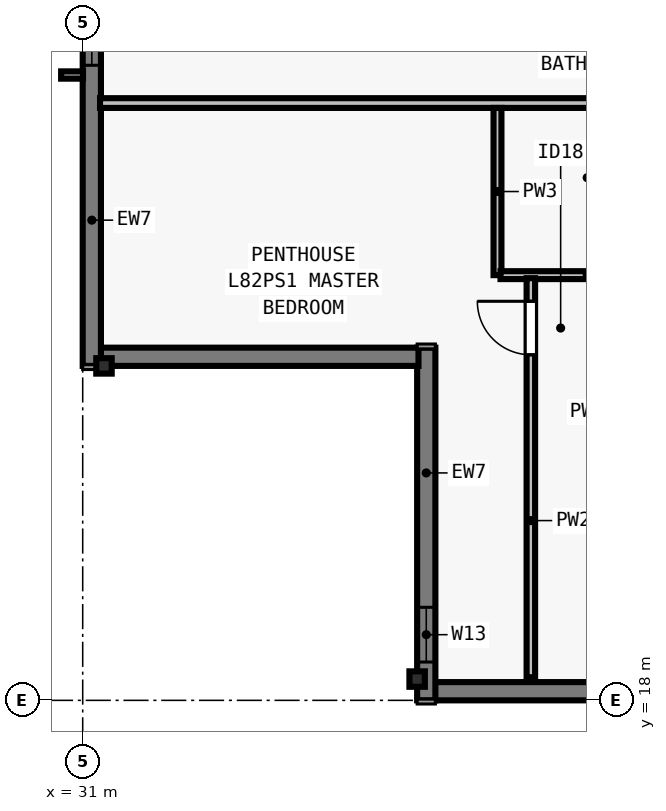
"""IFC4 building model, lengths in metres.
Left out: names, types, materials, properties, quantities, classifications, styles, units other than length and angle.
Written with IfcOpenShell. Run it as: python <this file> out.ifc"""

import sys

from ifc_helpers import new_model, si_unit, direction, frame, frame_2d, origin, origin_2d, place, context, subcontext, project, spatial, rectangle, i_section, extrude, element, fill, save


model = new_model("IFC4")
c1 = context("Model", 3, precision=1e-05, world=origin(), true_north=direction((0.0, 1.0)))
c2 = subcontext(c1, "Body", "Model", "MODEL_VIEW")
j1 = project(units=[si_unit("LENGTHUNIT", "METRE"), si_unit("PLANEANGLEUNIT", "RADIAN")], contexts=[c1])
p1 = place(None, origin())
s1 = spatial("IfcSite", under=j1, at=p1, CompositionType="ELEMENT")
p2 = place(p1, origin())
s2 = spatial("IfcBuilding", under=s1, at=p2, CompositionType="ELEMENT")
p3 = place(p2, frame((0.0, 0.0, 298.0)))
s3 = spatial("IfcBuildingStorey", under=s2, at=p3, CompositionType="ELEMENT", Elevation=298.0)
for number, where, z_axis, x_axis in (
    (1, (36.5, 18.35, 0.0), (0.0, 0.0, 1.0), (1.0, 0.0, 0.0)),
    (2, (31.35, 23.5, 0.0), (0.0, 0.0, 1.0), (0.0, 1.0, 0.0)),
):
    element("IfcColumn", number, at=place(p3, frame(where, z_axis=z_axis, x_axis=x_axis)), inside=s3, PredefinedType="COLUMN", context=c2, shape_type="SweptSolid", body=[
        extrude(i_section(OverallWidth=0.254, OverallDepth=0.254, WebThickness=0.009, FlangeThickness=0.014, FilletRadius=0.013, at=origin_2d()), origin(), (0.0, 0.0, 1.0), 3.5),
    ])
p4 = place(p3, frame((67.5, 18.15, 0.0), z_axis=(0.0, 0.0, 1.0), x_axis=(-1.0, 0.0, 0.0)))
e3 = element("IfcWall", 3, at=p4, inside=s3, PredefinedType="SOLIDWALL", context=c2, shape_type="SweptSolid", body=[
    extrude(rectangle(XDim=30.722, YDim=0.3, at=frame_2d((15.361, 0.0))), origin(), (0.0, 0.0, 1.0), 3.29),
])
p5 = place(p4, frame((4.944, 0.0, 0.8)))
e4 = element("IfcOpeningElement", 4, at=p5, cuts=e3, PredefinedType="OPENING", context=c2, shape_type="SweptSolid", body=[
    extrude(rectangle(XDim=1.65, YDim=1.758, at=frame_2d((0.825, 0.879))), frame((0.0, 0.16, 0.0), z_axis=(0.0, -1.0, 0.0), x_axis=(1.0, 0.0, 0.0)), (0.0, 0.0, 1.0), 0.32),
])
p6 = place(p4, frame((7.756, 0.0, 0.8)))
e5 = element("IfcOpeningElement", 5, at=p6, cuts=e3, PredefinedType="OPENING", context=c2, shape_type="SweptSolid", body=[
    extrude(rectangle(XDim=2.0, YDim=1.758, at=frame_2d((1.0, 0.879))), frame((0.0, 0.16, 0.0), z_axis=(0.0, -1.0, 0.0), x_axis=(1.0, 0.0, 0.0)), (0.0, 0.0, 1.0), 0.32),
])
p7 = place(p4, frame((12.617, 0.0, 0.8)))
e6 = element("IfcOpeningElement", 6, at=p7, cuts=e3, PredefinedType="OPENING", context=c2, shape_type="SweptSolid", body=[
    extrude(rectangle(XDim=1.65, YDim=1.758, at=frame_2d((0.825, 0.879))), frame((0.0, 0.16, 0.0), z_axis=(0.0, -1.0, 0.0), x_axis=(1.0, 0.0, 0.0)), (0.0, 0.0, 1.0), 0.32),
])
p8 = place(p4, frame((16.28, 0.0, 0.8)))
e7 = element("IfcOpeningElement", 7, at=p8, cuts=e3, PredefinedType="OPENING", context=c2, shape_type="SweptSolid", body=[
    extrude(rectangle(XDim=2.0, YDim=1.758, at=frame_2d((1.0, 0.879))), frame((0.0, 0.16, 0.0), z_axis=(0.0, -1.0, 0.0), x_axis=(1.0, 0.0, 0.0)), (0.0, 0.0, 1.0), 0.32),
])
p9 = place(p4, frame((21.142, 0.0, 0.8)))
e8 = element("IfcOpeningElement", 8, at=p9, cuts=e3, PredefinedType="OPENING", context=c2, shape_type="SweptSolid", body=[
    extrude(rectangle(XDim=1.65, YDim=1.758, at=frame_2d((0.825, 0.879))), frame((0.0, 0.16, 0.0), z_axis=(0.0, -1.0, 0.0), x_axis=(1.0, 0.0, 0.0)), (0.0, 0.0, 1.0), 0.32),
])
p10 = place(p4, frame((23.954, 0.0, 0.8)))
e9 = element("IfcOpeningElement", 9, at=p10, cuts=e3, PredefinedType="OPENING", context=c2, shape_type="SweptSolid", body=[
    extrude(rectangle(XDim=2.0, YDim=1.758, at=frame_2d((1.0, 0.879))), frame((0.0, 0.16, 0.0), z_axis=(0.0, -1.0, 0.0), x_axis=(1.0, 0.0, 0.0)), (0.0, 0.0, 1.0), 0.32),
])
p11 = place(p3, frame((36.65, 18.0, 0.0), z_axis=(0.0, 0.0, 1.0), x_axis=(0.0, 1.0, 0.0)))
e10 = element("IfcWall", 10, at=p11, inside=s3, PredefinedType="SOLIDWALL", context=c2, shape_type="SweptSolid", body=[
    extrude(rectangle(XDim=5.8, YDim=0.3, at=frame_2d((2.9, 0.0))), origin(), (0.0, 0.0, 1.0), 3.29),
])
p12 = place(p11, frame((0.63, 0.0, 0.8)))
e11 = element("IfcOpeningElement", 11, at=p12, cuts=e10, PredefinedType="OPENING", context=c2, shape_type="SweptSolid", body=[
    extrude(rectangle(XDim=0.9, YDim=1.75, at=frame_2d((0.45, 0.875))), frame((0.0, 0.16, 0.0), z_axis=(0.0, -1.0, 0.0), x_axis=(1.0, 0.0, 0.0)), (0.0, 0.0, 1.0), 0.32),
])
p13 = place(p3, frame((36.522, 23.65, 0.0), z_axis=(0.0, 0.0, 1.0), x_axis=(-1.0, 0.0, 0.0)))
e12 = element("IfcWall", 12, at=p13, inside=s3, PredefinedType="SOLIDWALL", context=c2, shape_type="SweptSolid", body=[
    extrude(rectangle(XDim=5.244, YDim=0.3, at=frame_2d((2.622, 0.0))), origin(), (0.0, 0.0, 1.0), 3.29),
])
p14 = place(p3, frame((31.15, 23.5, 0.0), z_axis=(0.0, 0.0, 1.0), x_axis=(0.0, 1.0, 0.0)))
e13 = element("IfcWall", 13, at=p14, inside=s3, PredefinedType="SOLIDWALL", context=c2, shape_type="SweptSolid", body=[
    extrude(rectangle(XDim=30.722, YDim=0.3, at=frame_2d((15.361, 0.0))), origin(), (0.0, 0.0, 1.0), 3.29),
])
p15 = place(p14, frame((4.944, 0.0, 0.8)))
e14 = element("IfcOpeningElement", 14, at=p15, cuts=e13, PredefinedType="OPENING", context=c2, shape_type="SweptSolid", body=[
    extrude(rectangle(XDim=1.65, YDim=1.758, at=frame_2d((0.825, 0.879))), frame((0.0, 0.16, 0.0), z_axis=(0.0, -1.0, 0.0), x_axis=(1.0, 0.0, 0.0)), (0.0, 0.0, 1.0), 0.32),
])
p16 = place(p14, frame((7.355, 0.0, 0.8)))
e15 = element("IfcOpeningElement", 15, at=p16, cuts=e13, PredefinedType="OPENING", context=c2, shape_type="SweptSolid", body=[
    extrude(rectangle(XDim=2.0, YDim=1.758, at=frame_2d((1.0, 0.879))), frame((0.0, 0.16, 0.0), z_axis=(0.0, -1.0, 0.0), x_axis=(1.0, 0.0, 0.0)), (0.0, 0.0, 1.0), 0.32),
])
p17 = place(p14, frame((12.617, 0.0, 0.8)))
e16 = element("IfcOpeningElement", 16, at=p17, cuts=e13, PredefinedType="OPENING", context=c2, shape_type="SweptSolid", body=[
    extrude(rectangle(XDim=1.65, YDim=1.758, at=frame_2d((0.825, 0.879))), frame((0.0, 0.16, 0.0), z_axis=(0.0, -1.0, 0.0), x_axis=(1.0, 0.0, 0.0)), (0.0, 0.0, 1.0), 0.32),
])
p18 = place(p14, frame((16.28, 0.0, 0.8)))
e17 = element("IfcOpeningElement", 17, at=p18, cuts=e13, PredefinedType="OPENING", context=c2, shape_type="SweptSolid", body=[
    extrude(rectangle(XDim=2.0, YDim=1.758, at=frame_2d((1.0, 0.879))), frame((0.0, 0.16, 0.0), z_axis=(0.0, -1.0, 0.0), x_axis=(1.0, 0.0, 0.0)), (0.0, 0.0, 1.0), 0.32),
])
p19 = place(p14, frame((21.142, 0.0, 0.8)))
e18 = element("IfcOpeningElement", 18, at=p19, cuts=e13, PredefinedType="OPENING", context=c2, shape_type="SweptSolid", body=[
    extrude(rectangle(XDim=1.65, YDim=1.758, at=frame_2d((0.825, 0.879))), frame((0.0, 0.16, 0.0), z_axis=(0.0, -1.0, 0.0), x_axis=(1.0, 0.0, 0.0)), (0.0, 0.0, 1.0), 0.32),
])
p20 = place(p14, frame((27.11, 0.0, 0.8)))
e19 = element("IfcOpeningElement", 19, at=p20, cuts=e13, PredefinedType="OPENING", context=c2, shape_type="SweptSolid", body=[
    extrude(rectangle(XDim=0.9, YDim=1.75, at=frame_2d((0.45, 0.875))), frame((0.0, 0.16, 0.0), z_axis=(0.0, -1.0, 0.0), x_axis=(1.0, 0.0, 0.0)), (0.0, 0.0, 1.0), 0.32),
])
p21 = place(p3, frame((31.285, 27.823, 0.0), z_axis=(0.0, 0.0, 1.0), x_axis=(1.0, 0.0, 0.0)))
e20 = element("IfcWall", 20, at=p21, inside=s3, PredefinedType="PARTITIONING", context=c2, shape_type="SweptSolid", body=[
    extrude(rectangle(XDim=41.43, YDim=0.16, at=frame_2d((20.715, 0.0))), origin(), (0.0, 0.0, 1.0), 3.009),
])
p22 = place(p21, frame((10.156, 0.0, 0.0)))
e21 = element("IfcOpeningElement", 21, at=p22, cuts=e20, PredefinedType="OPENING", context=c2, shape_type="SweptSolid", body=[
    extrude(rectangle(XDim=0.96, YDim=2.18, at=frame_2d((0.48, 1.09))), frame((0.0, 0.09, 0.0), z_axis=(0.0, -1.0, 0.0), x_axis=(1.0, 0.0, 0.0)), (0.0, 0.0, 1.0), 0.18),
])
p23 = place(p21, frame((30.736, 0.0, 0.0)))
e22 = element("IfcOpeningElement", 22, at=p23, cuts=e20, PredefinedType="OPENING", context=c2, shape_type="SweptSolid", body=[
    extrude(rectangle(XDim=0.96, YDim=2.18, at=frame_2d((0.48, 1.09))), frame((0.0, 0.09, 0.0), z_axis=(0.0, -1.0, 0.0), x_axis=(1.0, 0.0, 0.0)), (0.0, 0.0, 1.0), 0.18),
])
p24 = place(p3, frame((37.821, 24.992, 0.0), z_axis=(0.0, 0.0, 1.0), x_axis=(0.0, 1.0, 0.0)))
e23 = element("IfcWall", 23, at=p24, inside=s3, PredefinedType="PLUMBINGWALL", context=c2, shape_type="SweptSolid", body=[
    extrude(rectangle(XDim=2.75, YDim=0.13, at=frame_2d((1.375, 0.0))), origin(), (0.0, 0.0, 1.0), 3.29),
])
p25 = place(p3, frame((37.871, 24.992, 0.0), z_axis=(0.0, 0.0, 1.0), x_axis=(1.0, 0.0, 0.0)))
e24 = element("IfcWall", 24, at=p25, inside=s3, PredefinedType="PLUMBINGWALL", context=c2, shape_type="SweptSolid", body=[
    extrude(rectangle(XDim=2.85, YDim=0.13, at=frame_2d((1.425, 0.0))), origin(), (0.0, 0.0, 1.0), 3.29),
])
p26 = place(p3, frame((38.37, 18.38, 0.0), z_axis=(0.0, 0.0, 1.0), x_axis=(0.0, 1.0, 0.0)))
e25 = element("IfcWall", 25, at=p26, inside=s3, PredefinedType="PARTITIONING", context=c2, shape_type="SweptSolid", body=[
    extrude(rectangle(XDim=6.562, YDim=0.14, at=frame_2d((3.281, 0.0))), origin(), (0.0, 0.0, 1.0), 2.653),
])
p27 = place(p26, frame((5.302, 0.0, 0.0)))
e26 = element("IfcOpeningElement", 26, at=p27, cuts=e25, PredefinedType="OPENING", context=c2, shape_type="SweptSolid", body=[
    extrude(rectangle(XDim=0.88, YDim=2.1, at=frame_2d((0.44, 1.05))), frame((0.0, 0.08, 0.0), z_axis=(0.0, -1.0, 0.0), x_axis=(1.0, 0.0, 0.0)), (0.0, 0.0, 1.0), 0.16),
])
p28 = place(p15, origin())
e27 = element("IfcWindow", 27, at=p28, inside=s3, PartitioningType="SINGLE_PANEL", PredefinedType="WINDOW", context=c2, shape_type="SweptSolid", body=[
    extrude(rectangle(XDim=1.65, YDim=1.758, at=frame_2d((0.825, 0.879))), frame((0.0, -0.05, 0.0), z_axis=(0.0, -1.0, 0.0), x_axis=(1.0, 0.0, 0.0)), (0.0, 0.0, 1.0), 0.06),
])
fill(e14, e27)
p29 = place(p12, origin())
e28 = element("IfcWindow", 28, at=p29, inside=s3, PartitioningType="SINGLE_PANEL", PredefinedType="WINDOW", context=c2, shape_type="SweptSolid", body=[
    extrude(rectangle(XDim=0.9, YDim=1.75, at=frame_2d((0.45, 0.875))), frame((0.0, -0.04, 0.0), z_axis=(0.0, -1.0, 0.0), x_axis=(1.0, 0.0, 0.0)), (0.0, 0.0, 1.0), 0.06),
])
fill(e11, e28)
p30 = place(p27, origin())
e29 = element("IfcDoor", 29, at=p30, inside=s3, OperationType="SINGLE_SWING_RIGHT", PredefinedType="DOOR", context=c2, shape_type="SweptSolid", body=[
    extrude(rectangle(XDim=0.88, YDim=2.1, at=frame_2d((0.44, 1.05))), frame((0.0, 0.025, 0.0), z_axis=(0.0, -1.0, 0.0), x_axis=(1.0, 0.0, 0.0)), (0.0, 0.0, 1.0), 0.05),
])
fill(e26, e29)
save(model, sys.argv[1])
